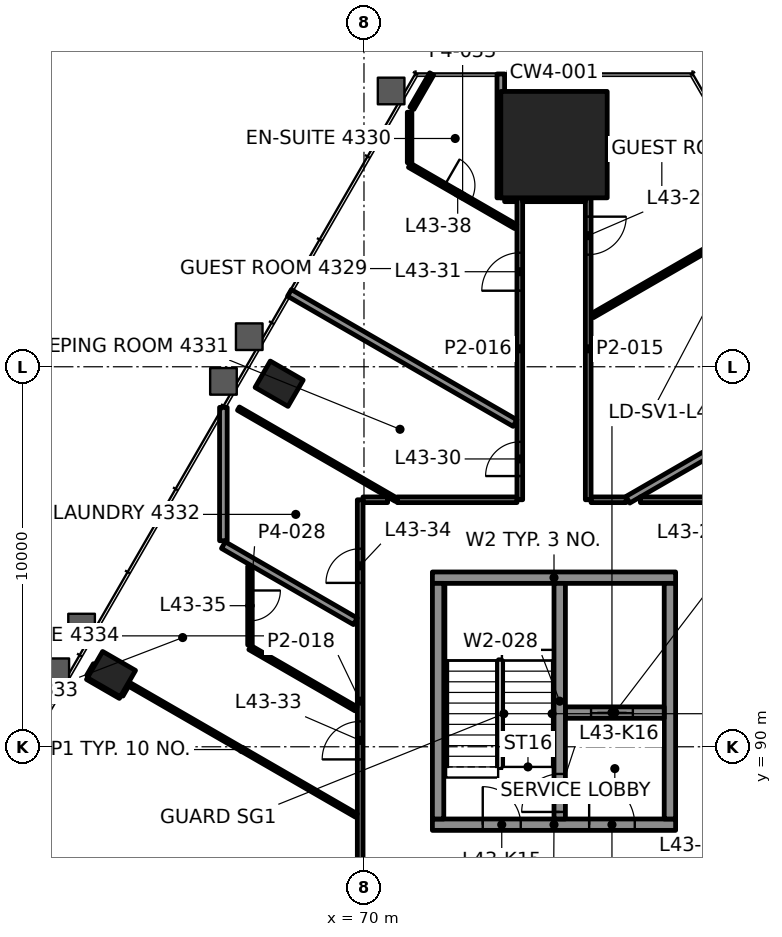
"""IFC4 building model, lengths in metres.
Left out: names, types, materials, properties, quantities, classifications, styles, units other than length and angle.
Written with IfcOpenShell. Run it as: python <this file> out.ifc"""

import sys

from ifc_helpers import new_model, si_unit, direction, frame, frame_2d, origin, origin_2d, place, context, subcontext, project, spatial, rectangle, hollow_rectangle, extrude, element, fill, save


model = new_model("IFC4")
c1 = context("Model", 3, precision=1e-05, world=origin(), true_north=direction((0.0, 1.0)))
c2 = subcontext(c1, "Body", "Model", "MODEL_VIEW")
j1 = project(units=[si_unit("LENGTHUNIT", "METRE"), si_unit("PLANEANGLEUNIT", "RADIAN")], contexts=[c1])
p1 = place(None, origin())
s1 = spatial("IfcSite", under=j1, at=p1, CompositionType="ELEMENT")
p2 = place(p1, origin())
s2 = spatial("IfcBuilding", under=s1, at=p2, CompositionType="ELEMENT")
p3 = place(p2, frame((0.0, 0.0, 187.0)))
s3 = spatial("IfcBuildingStorey", under=s2, at=p3, CompositionType="ELEMENT", Elevation=187.0)
p4 = place(p3, frame((75.0, 105.845, 0.0), z_axis=(0.0, 0.0, 1.0), x_axis=(-1.0, 0.0, 0.0)))
e1 = element("IfcColumn", 1, at=p4, inside=s3, PredefinedType="COLUMN", context=c2, shape_type="SweptSolid", body=[
    extrude(rectangle(XDim=2.8, YDim=2.8, at=origin_2d()), origin(), (0.0, 0.0, 1.0), 3.9),
])
for number, where, z_axis, x_axis in (
    (2, (67.768, 99.553, -0.0), (0.0, 0.0, 1.0), (-0.5, -0.866, 0.0)),
    (3, (63.355, 91.912, -0.0), (0.0, 0.0, 1.0), (-0.5, -0.866, 0.0)),
):
    element("IfcColumn", number, at=place(p3, frame(where, z_axis=z_axis, x_axis=x_axis)), inside=s3, PredefinedType="COLUMN", context=c2, shape_type="SweptSolid", body=[
        extrude(hollow_rectangle(XDim=0.8, YDim=1.0, WallThickness=0.05, at=origin_2d()), origin(), (0.0, 0.0, 1.0), 3.9),
    ])
p5 = place(p3, frame((71.8, 87.95, 0.0), z_axis=(0.0, 0.0, 1.0), x_axis=(1.0, 0.0, 0.0)))
e4 = element("IfcWall", 4, at=p5, inside=s3, PredefinedType="SHEAR", context=c2, shape_type="SweptSolid", body=[
    extrude(rectangle(XDim=6.4, YDim=0.3, at=frame_2d((3.2, 0.0))), origin(), (0.0, 0.0, 1.0), 3.7),
])
p6 = place(p5, frame((1.325, 0.0, 0.0)))
e5 = element("IfcOpeningElement", 5, at=p6, cuts=e4, PredefinedType="OPENING", context=c2, shape_type="SweptSolid", body=[
    extrude(rectangle(XDim=1.0, YDim=2.1, at=frame_2d((0.5, 1.05))), frame((0.0, 0.16, 0.0), z_axis=(0.0, -1.0, 0.0), x_axis=(1.0, 0.0, 0.0)), (0.0, 0.0, 1.0), 0.32),
])
p7 = place(p5, frame((4.125, 0.0, 0.0)))
e6 = element("IfcOpeningElement", 6, at=p7, cuts=e4, PredefinedType="OPENING", context=c2, shape_type="SweptSolid", body=[
    extrude(rectangle(XDim=1.2, YDim=2.1, at=frame_2d((0.6, 1.05))), frame((0.0, 0.16, 0.0), z_axis=(0.0, -1.0, 0.0), x_axis=(1.0, 0.0, 0.0)), (0.0, 0.0, 1.0), 0.32),
])
p8 = place(p3, frame((71.8, 94.45, 0.0), z_axis=(0.0, 0.0, 1.0), x_axis=(1.0, 0.0, 0.0)))
e7 = element("IfcWall", 7, at=p8, inside=s3, PredefinedType="SHEAR", context=c2, shape_type="SweptSolid", body=[
    extrude(rectangle(XDim=6.4, YDim=0.3, at=frame_2d((3.2, 0.0))), origin(), (0.0, 0.0, 1.0), 3.7),
])
for number, where, z_axis, x_axis in (
    (8, (71.95, 88.1, 0.0), (0.0, 0.0, 1.0), (0.0, 1.0, 0.0)),
    (9, (78.05, 88.1, 0.0), (0.0, 0.0, 1.0), (0.0, 1.0, 0.0)),
):
    element("IfcWall", number, at=place(p3, frame(where, z_axis=z_axis, x_axis=x_axis)), inside=s3, PredefinedType="SHEAR", context=c2, shape_type="SweptSolid", body=[
        extrude(rectangle(XDim=6.2, YDim=0.3, at=frame_2d((3.1, 0.0))), origin(), (0.0, 0.0, 1.0), 3.7),
    ])
p9 = place(p3, frame((75.3, 90.9, 0.0), z_axis=(0.0, 0.0, 1.0), x_axis=(1.0, 0.0, 0.0)))
e10 = element("IfcWall", 10, at=p9, inside=s3, PredefinedType="SHEAR", context=c2, shape_type="SweptSolid", body=[
    extrude(rectangle(XDim=2.6, YDim=0.3, at=frame_2d((1.3, 0.0))), origin(), (0.0, 0.0, 1.0), 3.7),
])
p10 = place(p9, frame((0.675, 0.0, 0.0)))
e11 = element("IfcOpeningElement", 11, at=p10, cuts=e10, PredefinedType="OPENING", context=c2, shape_type="SweptSolid", body=[
    extrude(rectangle(XDim=1.1, YDim=2.1, at=frame_2d((0.55, 1.05))), frame((0.0, 0.16, 0.0), z_axis=(0.0, -1.0, 0.0), x_axis=(1.0, 0.0, 0.0)), (0.0, 0.0, 1.0), 0.32),
])
p11 = place(p3, frame((75.15, 88.1, 0.0), z_axis=(0.0, 0.0, 1.0), x_axis=(0.0, 1.0, 0.0)))
e12 = element("IfcWall", 12, at=p11, inside=s3, PredefinedType="SHEAR", context=c2, shape_type="SweptSolid", body=[
    extrude(rectangle(XDim=6.2, YDim=0.3, at=frame_2d((3.1, 0.0))), origin(), (0.0, 0.0, 1.0), 3.7),
])
p12 = place(p11, frame((0.185, 0.0, 0.0)))
e13 = element("IfcOpeningElement", 13, at=p12, cuts=e12, PredefinedType="OPENING", context=c2, shape_type="SweptSolid", body=[
    extrude(rectangle(XDim=1.0, YDim=2.1, at=frame_2d((0.5, 1.05))), frame((0.0, 0.16, 0.0), z_axis=(0.0, -1.0, 0.0), x_axis=(1.0, 0.0, 0.0)), (0.0, 0.0, 1.0), 0.32),
])
p13 = place(p3, frame((69.975, 96.5, 0.0), z_axis=(0.0, 0.0, 1.0), x_axis=(1.0, 0.0, 0.0)))
e14 = element("IfcWall", 14, at=p13, inside=s3, PredefinedType="PARTITIONING", context=c2, shape_type="SweptSolid", body=[
    extrude(rectangle(XDim=0.646, YDim=0.15, at=frame_2d((0.323, 0.0))), origin(), (0.0, 0.0, 1.0), 3.1),
])
p14 = place(p3, frame((75.975, 96.5, 0.0), z_axis=(0.0, 0.0, 1.0), x_axis=(1.0, 0.0, 0.0)))
e15 = element("IfcWall", 15, at=p14, inside=s3, PredefinedType="PARTITIONING", context=c2, shape_type="SweptSolid", body=[
    extrude(rectangle(XDim=0.925, YDim=0.15, at=frame_2d((0.463, 0.0))), origin(), (0.0, 0.0, 1.0), 3.1),
])
p15 = place(p3, frame((73.7, 104.445, 0.0), z_axis=(0.0, 0.0, 1.0), x_axis=(1.0, 0.0, 0.0)))
e16 = element("IfcWall", 16, at=p15, inside=s3, PredefinedType="PARTITIONING", context=c2, shape_type="SweptSolid", body=[
    extrude(rectangle(XDim=0.324, YDim=0.2, at=frame_2d((0.162, 0.0))), origin(), (0.0, 0.0, 1.0), 3.1),
])
p16 = place(p3, frame((76.943, 96.5, 0.0), z_axis=(0.0, 0.0, 1.0), x_axis=(0.866015917575, 0.500016430238, 0.0)))
e17 = element("IfcWall", 17, at=p16, inside=s3, PredefinedType="PARTITIONING", context=c2, shape_type="SweptSolid", body=[
    extrude(rectangle(XDim=5.607, YDim=0.2, at=frame_2d((2.804, 0.0))), origin(), (0.0, 0.0, 1.0), 3.1),
])
p17 = place(p3, frame((76.01, 101.346, 0.0), z_axis=(0.0, 0.0, 1.0), x_axis=(0.866045460162, 0.499965259726, 0.0)))
e18 = element("IfcWall", 18, at=p17, inside=s3, PredefinedType="PARTITIONING", context=c2, shape_type="SweptSolid", body=[
    extrude(rectangle(XDim=3.569, YDim=0.12, at=frame_2d((1.784, 0.0))), origin(), (0.0, 0.0, 1.0), 3.1),
])
p18 = place(p3, frame((63.614, 91.359, 0.0), z_axis=(0.0, 0.0, 1.0), x_axis=(0.499557828523, 0.866280541142, 0.0)))
e19 = element("IfcWall", 19, at=p18, inside=s3, PredefinedType="PARTITIONING", context=c2, shape_type="SweptSolid", body=[
    extrude(rectangle(XDim=0.3, YDim=0.1, at=frame_2d((0.15, 0.0))), origin(), (0.0, 0.0, 1.0), 3.022),
])
p19 = place(p3, frame((62.748, 91.859, 0.0), z_axis=(0.0, 0.0, 1.0), x_axis=(0.500044870432, 0.865999496279, 0.0)))
e20 = element("IfcWall", 20, at=p19, inside=s3, PredefinedType="PARTITIONING", context=c2, shape_type="SweptSolid", body=[
    extrude(rectangle(XDim=0.35, YDim=0.1, at=frame_2d((0.175, 0.0))), origin(), (0.0, 0.0, 1.0), 3.1),
])
p20 = place(p3, frame((71.26, 106.802, 0.0), z_axis=(0.0, 0.0, 1.0), x_axis=(0.500094169602, 0.865971028112, 0.0)))
e21 = element("IfcWall", 21, at=p20, inside=s3, PredefinedType="PARTITIONING", context=c2, shape_type="SweptSolid", body=[
    extrude(rectangle(XDim=1.042, YDim=0.12, at=frame_2d((0.521, 0.0))), origin(), (0.0, 0.0, 1.0), 3.1),
])
p21 = place(p3, frame((75.9, 104.445, 0.0), z_axis=(0.0, 0.0, 1.0), x_axis=(0.0, -1.0, 0.0)))
e22 = element("IfcWall", 22, at=p21, inside=s3, PredefinedType="PARTITIONING", context=c2, shape_type="SweptSolid", body=[
    extrude(rectangle(XDim=7.945, YDim=0.15, at=frame_2d((3.972, 0.0))), origin(), (0.0, 0.0, 1.0), 3.1),
])
p22 = place(p21, frame((0.495, 0.0, 0.0)))
e23 = element("IfcOpeningElement", 23, at=p22, cuts=e22, PredefinedType="OPENING", context=c2, shape_type="SweptSolid", body=[
    extrude(rectangle(XDim=1.0, YDim=2.1, at=frame_2d((0.5, 1.05))), frame((0.0, 0.085, 0.0), z_axis=(0.0, -1.0, 0.0), x_axis=(1.0, 0.0, 0.0)), (0.0, 0.0, 1.0), 0.17),
])
p23 = place(p3, frame((74.1, 96.5, 0.0), z_axis=(0.0, 0.0, 1.0), x_axis=(0.0, 1.0, 0.0)))
e24 = element("IfcWall", 24, at=p23, inside=s3, PredefinedType="PARTITIONING", context=c2, shape_type="SweptSolid", body=[
    extrude(rectangle(XDim=7.945, YDim=0.15, at=frame_2d((3.973, 0.0))), origin(), (0.0, 0.0, 1.0), 3.1),
])
p24 = place(p23, frame((0.624, 0.0, 0.0)))
e25 = element("IfcOpeningElement", 25, at=p24, cuts=e24, PredefinedType="OPENING", context=c2, shape_type="SweptSolid", body=[
    extrude(rectangle(XDim=0.9, YDim=2.1, at=frame_2d((0.45, 1.05))), frame((0.0, 0.085, 0.0), z_axis=(0.0, -1.0, 0.0), x_axis=(1.0, 0.0, 0.0)), (0.0, 0.0, 1.0), 0.17),
])
p25 = place(p23, frame((5.501, 0.0, 0.0)))
e26 = element("IfcOpeningElement", 26, at=p25, cuts=e24, PredefinedType="OPENING", context=c2, shape_type="SweptSolid", body=[
    extrude(rectangle(XDim=1.0, YDim=2.1, at=frame_2d((0.5, 1.05))), frame((0.0, 0.085, 0.0), z_axis=(0.0, -1.0, 0.0), x_axis=(1.0, 0.0, 0.0)), (0.0, 0.0, 1.0), 0.17),
])
p26 = place(p3, frame((73.6, 104.446, 0.0), z_axis=(0.0, 0.0, 1.0), x_axis=(0.0, 1.0, 0.0)))
e27 = element("IfcWall", 27, at=p26, inside=s3, PredefinedType="PARTITIONING", context=c2, shape_type="SweptSolid", body=[
    extrude(rectangle(XDim=3.259, YDim=0.2, at=frame_2d((1.63, 0.0))), origin(), (0.0, 0.0, 1.0), 3.1),
])
p27 = place(p3, frame((71.2, 105.369, 0.0), z_axis=(0.0, 0.0, 1.0), x_axis=(0.0, 1.0, 0.0)))
e28 = element("IfcWall", 28, at=p27, inside=s3, PredefinedType="PARTITIONING", context=c2, shape_type="SweptSolid", body=[
    extrude(rectangle(XDim=1.329, YDim=0.12, at=frame_2d((0.665, 0.0))), origin(), (0.0, 0.0, 1.0), 3.1),
])
p28 = place(p3, frame((69.9, 85.9, 0.0), z_axis=(0.0, 0.0, 1.0), x_axis=(0.0, 1.0, 0.0)))
e29 = element("IfcWall", 29, at=p28, inside=s3, PredefinedType="PARTITIONING", context=c2, shape_type="SweptSolid", body=[
    extrude(rectangle(XDim=10.6, YDim=0.15, at=frame_2d((5.3, 0.0))), origin(), (0.0, 0.0, 1.0), 3.022),
])
p29 = place(p28, frame((3.767, 0.0, 0.0)))
e30 = element("IfcOpeningElement", 30, at=p29, cuts=e29, PredefinedType="OPENING", context=c2, shape_type="SweptSolid", body=[
    extrude(rectangle(XDim=1.0, YDim=2.1, at=frame_2d((0.5, 1.05))), frame((0.0, 0.085, 0.0), z_axis=(0.0, -1.0, 0.0), x_axis=(1.0, 0.0, 0.0)), (0.0, 0.0, 1.0), 0.17),
])
p30 = place(p28, frame((8.412, 0.0, 0.0)))
e31 = element("IfcOpeningElement", 31, at=p30, cuts=e29, PredefinedType="OPENING", context=c2, shape_type="SweptSolid", body=[
    extrude(rectangle(XDim=0.9, YDim=2.1, at=frame_2d((0.45, 1.05))), frame((0.0, 0.085, 0.0), z_axis=(0.0, -1.0, 0.0), x_axis=(1.0, 0.0, 0.0)), (0.0, 0.0, 1.0), 0.17),
])
p31 = place(p3, frame((67.0, 94.747, 0.0), z_axis=(0.0, 0.0, 1.0), x_axis=(0.0, -1.0, 0.0)))
e32 = element("IfcWall", 32, at=p31, inside=s3, PredefinedType="PARTITIONING", context=c2, shape_type="SweptSolid", body=[
    extrude(rectangle(XDim=2.068, YDim=0.12, at=frame_2d((1.034, 0.0))), origin(), (0.0, 0.0, 1.0), 3.1),
])
p32 = place(p31, frame((0.634, 0.0, 0.0)))
e33 = element("IfcOpeningElement", 33, at=p32, cuts=e32, PredefinedType="OPENING", context=c2, shape_type="SweptSolid", body=[
    extrude(rectangle(XDim=0.8, YDim=2.1, at=frame_2d((0.4, 1.05))), frame((0.0, 0.07, 0.0), z_axis=(0.0, -1.0, 0.0), x_axis=(1.0, 0.0, 0.0)), (0.0, 0.0, 1.0), 0.14),
])
p33 = place(p3, frame((66.3, 95.423, 0.0), z_axis=(0.0, 0.0, 1.0), x_axis=(0.0, 1.0, 0.0)))
e34 = element("IfcWall", 34, at=p33, inside=s3, PredefinedType="PARTITIONING", context=c2, shape_type="SweptSolid", body=[
    extrude(rectangle(XDim=3.509, YDim=0.2, at=frame_2d((1.754, 0.0))), origin(), (0.0, 0.0, 1.0), 3.022),
])
p34 = place(p3, frame((71.2, 105.301, 0.0), z_axis=(0.0, 0.0, 1.0), x_axis=(0.866010186656, -0.500026355914, 0.0)))
e35 = element("IfcWall", 35, at=p34, inside=s3, PredefinedType="PARTITIONING", context=c2, shape_type="SweptSolid", body=[
    extrude(rectangle(XDim=3.222, YDim=0.12, at=frame_2d((1.611, 0.0))), origin(), (0.0, 0.0, 1.0), 3.1),
])
p35 = place(p34, frame((1.061, 0.0, 0.0)))
e36 = element("IfcOpeningElement", 36, at=p35, cuts=e35, PredefinedType="OPENING", context=c2, shape_type="SweptSolid", body=[
    extrude(rectangle(XDim=0.8, YDim=2.1, at=frame_2d((0.4, 1.05))), frame((0.0, 0.07, 0.0), z_axis=(0.0, -1.0, 0.0), x_axis=(1.0, 0.0, 0.0)), (0.0, 0.0, 1.0), 0.14),
])
p36 = place(p3, frame((73.973, 98.518, 0.0), z_axis=(0.0, 0.0, 1.0), x_axis=(-0.866017662945, 0.500013407287, 0.0)))
e37 = element("IfcWall", 37, at=p36, inside=s3, PredefinedType="PARTITIONING", context=c2, shape_type="SweptSolid", body=[
    extrude(rectangle(XDim=6.852, YDim=0.2, at=frame_2d((3.426, 0.0))), origin(), (0.0, 0.0, 1.0), 3.1),
])
p37 = place(p3, frame((70.851, 96.5, 0.0), z_axis=(0.0, 0.0, 1.0), x_axis=(-0.866016914842, 0.500014702992, 0.0)))
e38 = element("IfcWall", 38, at=p37, inside=s3, PredefinedType="PARTITIONING", context=c2, shape_type="SweptSolid", body=[
    extrude(rectangle(XDim=4.797, YDim=0.1, at=frame_2d((2.398, 0.0))), origin(), (0.0, 0.0, 1.0), 3.022),
])
p38 = place(p3, frame((69.773, 93.302, 0.0), z_axis=(0.0, 0.0, 1.0), x_axis=(-0.866046692957, 0.499963124258, 0.0)))
e39 = element("IfcWall", 39, at=p38, inside=s3, PredefinedType="PARTITIONING", context=c2, shape_type="SweptSolid", body=[
    extrude(rectangle(XDim=4.01, YDim=0.2, at=frame_2d((2.005, 0.0))), origin(), (0.0, 0.0, 1.0), 3.1),
])
p39 = place(p3, frame((69.79, 90.998, 0.0), z_axis=(0.0, 0.0, 1.0), x_axis=(-0.866029130051, 0.499993545862, 0.0)))
e40 = element("IfcWall", 40, at=p39, inside=s3, PredefinedType="PARTITIONING", context=c2, shape_type="SweptSolid", body=[
    extrude(rectangle(XDim=3.222, YDim=0.12, at=frame_2d((1.611, 0.0))), origin(), (0.0, 0.0, 1.0), 3.1),
])
p40 = place(p3, frame((69.799, 88.192, 0.0), z_axis=(0.0, 0.0, 1.0), x_axis=(-0.866013353477, 0.500020871164, 0.0)))
e41 = element("IfcWall", 41, at=p40, inside=s3, PredefinedType="PARTITIONING", context=c2, shape_type="SweptSolid", body=[
    extrude(rectangle(XDim=6.94, YDim=0.1, at=frame_2d((3.47, 0.0))), origin(), (0.0, 0.0, 1.0), 3.022),
])
p41 = place(p3, frame((63.588, 91.316, 0.0), z_axis=(0.0, 0.0, 1.0), x_axis=(-0.866039090965, 0.499976292358, 0.0)))
e42 = element("IfcWall", 42, at=p41, inside=s3, PredefinedType="PARTITIONING", context=c2, shape_type="SweptSolid", body=[
    extrude(rectangle(XDim=0.999, YDim=0.1, at=frame_2d((0.5, 0.0))), origin(), (0.0, 0.0, 1.0), 3.022),
])
p42 = place(p3, frame((70.875, 96.5, 0.0), z_axis=(0.0, 0.0, 1.0), x_axis=(1.0, 0.0, 0.0)))
e43 = element("IfcWall", 43, at=p42, inside=s3, PredefinedType="PARTITIONING", context=c2, shape_type="SweptSolid", body=[
    extrude(rectangle(XDim=3.149, YDim=0.15, at=frame_2d((1.575, 0.0))), origin(), (0.0, 0.0, 1.0), 3.1),
])
p43 = place(p3, frame((77.273, 96.5, 0.0), z_axis=(0.0, 0.0, 1.0), x_axis=(1.0, 0.0, 0.0)))
e44 = element("IfcWall", 44, at=p43, inside=s3, PredefinedType="PARTITIONING", context=c2, shape_type="SweptSolid", body=[
    extrude(rectangle(XDim=2.752, YDim=0.15, at=frame_2d((1.376, 0.0))), origin(), (0.0, 0.0, 1.0), 3.1),
])
p44 = place(p3, frame((74.175, 104.445, 0.0), z_axis=(0.0, 0.0, 1.0), x_axis=(1.0, 0.0, 0.0)))
e45 = element("IfcWall", 45, at=p44, inside=s3, PredefinedType="PARTITIONING", context=c2, shape_type="SweptSolid", body=[
    extrude(rectangle(XDim=1.649, YDim=0.2, at=frame_2d((0.825, 0.0))), origin(), (0.0, 0.0, 1.0), 3.097),
])
p45 = place(p22, origin())
e46 = element("IfcDoor", 46, at=p45, inside=s3, OperationType="SINGLE_SWING_LEFT", PredefinedType="DOOR", context=c2, shape_type="SweptSolid", body=[
    extrude(rectangle(XDim=1.0, YDim=2.1, at=frame_2d((0.5, 1.05))), frame((0.0, 0.025, 0.0), z_axis=(0.0, -1.0, 0.0), x_axis=(1.0, 0.0, 0.0)), (0.0, 0.0, 1.0), 0.05),
])
fill(e23, e46)
p46 = place(p24, origin())
e47 = element("IfcDoor", 47, at=p46, inside=s3, OperationType="SINGLE_SWING_RIGHT", PredefinedType="DOOR", context=c2, shape_type="SweptSolid", body=[
    extrude(rectangle(XDim=0.9, YDim=2.1, at=frame_2d((0.45, 1.05))), frame((0.0, 0.025, 0.0), z_axis=(0.0, -1.0, 0.0), x_axis=(1.0, 0.0, 0.0)), (0.0, 0.0, 1.0), 0.05),
])
fill(e25, e47)
p47 = place(p25, origin())
e48 = element("IfcDoor", 48, at=p47, inside=s3, OperationType="SINGLE_SWING_RIGHT", PredefinedType="DOOR", context=c2, shape_type="SweptSolid", body=[
    extrude(rectangle(XDim=1.0, YDim=2.1, at=frame_2d((0.5, 1.05))), frame((0.0, 0.025, 0.0), z_axis=(0.0, -1.0, 0.0), x_axis=(1.0, 0.0, 0.0)), (0.0, 0.0, 1.0), 0.05),
])
fill(e26, e48)
p48 = place(p29, origin())
e49 = element("IfcDoor", 49, at=p48, inside=s3, OperationType="SINGLE_SWING_RIGHT", PredefinedType="DOOR", context=c2, shape_type="SweptSolid", body=[
    extrude(rectangle(XDim=1.0, YDim=2.1, at=frame_2d((0.5, 1.05))), frame((0.0, 0.025, 0.0), z_axis=(0.0, -1.0, 0.0), x_axis=(1.0, 0.0, 0.0)), (0.0, 0.0, 1.0), 0.05),
])
fill(e30, e49)
p49 = place(p30, origin())
e50 = element("IfcDoor", 50, at=p49, inside=s3, OperationType="SINGLE_SWING_LEFT", PredefinedType="DOOR", context=c2, shape_type="SweptSolid", body=[
    extrude(rectangle(XDim=0.9, YDim=2.1, at=frame_2d((0.45, 1.05))), frame((0.0, 0.025, 0.0), z_axis=(0.0, -1.0, 0.0), x_axis=(1.0, 0.0, 0.0)), (0.0, 0.0, 1.0), 0.05),
])
fill(e31, e50)
p50 = place(p32, origin())
e51 = element("IfcDoor", 51, at=p50, inside=s3, OperationType="SINGLE_SWING_RIGHT", PredefinedType="DOOR", context=c2, shape_type="SweptSolid", body=[
    extrude(rectangle(XDim=0.8, YDim=2.1, at=frame_2d((0.4, 1.05))), frame((0.0, 0.025, 0.0), z_axis=(0.0, -1.0, 0.0), x_axis=(1.0, 0.0, 0.0)), (0.0, 0.0, 1.0), 0.05),
])
fill(e33, e51)
p51 = place(p35, origin())
e52 = element("IfcDoor", 52, at=p51, inside=s3, OperationType="SINGLE_SWING_RIGHT", PredefinedType="DOOR", context=c2, shape_type="SweptSolid", body=[
    extrude(rectangle(XDim=0.8, YDim=2.1, at=frame_2d((0.4, 1.05))), frame((0.0, 0.025, 0.0), z_axis=(0.0, -1.0, 0.0), x_axis=(1.0, 0.0, 0.0)), (0.0, 0.0, 1.0), 0.05),
])
fill(e36, e52)
p52 = place(p3, origin())
p53 = place(p52, frame((69.864, 105.134, 0.15), z_axis=(0.0, 0.0, 1.0), x_axis=(-0.5, -0.866025, 0.0)))
p54 = place(p53, origin())
e53 = element("IfcWindow", 53, at=p54, inside=s3, PartitioningType="SINGLE_PANEL", PredefinedType="WINDOW", context=c2, shape_type="SweptSolid", body=[
    extrude(rectangle(XDim=2.866, YDim=3.55, at=frame_2d((1.433, 1.775))), frame((0.0, 0.03, 0.0), z_axis=(0.0, -1.0, 0.0), x_axis=(1.0, 0.0, 0.0)), (0.0, 0.0, 1.0), 0.06),
])
p55 = place(p10, origin())
e54 = element("IfcDoor", 54, at=p55, inside=s3, OperationType="DOUBLE_DOOR_SLIDING", PredefinedType="DOOR", context=c2, shape_type="SweptSolid", body=[
    extrude(rectangle(XDim=1.1, YDim=2.1, at=frame_2d((0.55, 1.05))), frame((0.0, 0.025, 0.0), z_axis=(0.0, -1.0, 0.0), x_axis=(1.0, 0.0, 0.0)), (0.0, 0.0, 1.0), 0.05),
])
fill(e11, e54)
p56 = place(p6, origin())
e55 = element("IfcDoor", 55, at=p56, inside=s3, OperationType="SINGLE_SWING_RIGHT", PredefinedType="DOOR", context=c2, shape_type="SweptSolid", body=[
    extrude(rectangle(XDim=1.0, YDim=2.1, at=frame_2d((0.5, 1.05))), frame((0.0, 0.025, 0.0), z_axis=(0.0, -1.0, 0.0), x_axis=(1.0, 0.0, 0.0)), (0.0, 0.0, 1.0), 0.05),
])
fill(e5, e55)
p57 = place(p12, origin())
e56 = element("IfcDoor", 56, at=p57, inside=s3, OperationType="SINGLE_SWING_LEFT", PredefinedType="DOOR", context=c2, shape_type="SweptSolid", body=[
    extrude(rectangle(XDim=1.0, YDim=2.1, at=frame_2d((0.5, 1.05))), frame((0.0, 0.025, 0.0), z_axis=(0.0, -1.0, 0.0), x_axis=(1.0, 0.0, 0.0)), (0.0, 0.0, 1.0), 0.05),
])
fill(e13, e56)
p58 = place(p7, origin())
e57 = element("IfcDoor", 57, at=p58, inside=s3, OperationType="SINGLE_SWING_RIGHT", PredefinedType="DOOR", context=c2, shape_type="SweptSolid", body=[
    extrude(rectangle(XDim=1.2, YDim=2.1, at=frame_2d((0.6, 1.05))), frame((0.0, 0.025, 0.0), z_axis=(0.0, -1.0, 0.0), x_axis=(1.0, 0.0, 0.0)), (0.0, 0.0, 1.0), 0.05),
])
fill(e6, e57)
save(model, sys.argv[1])
